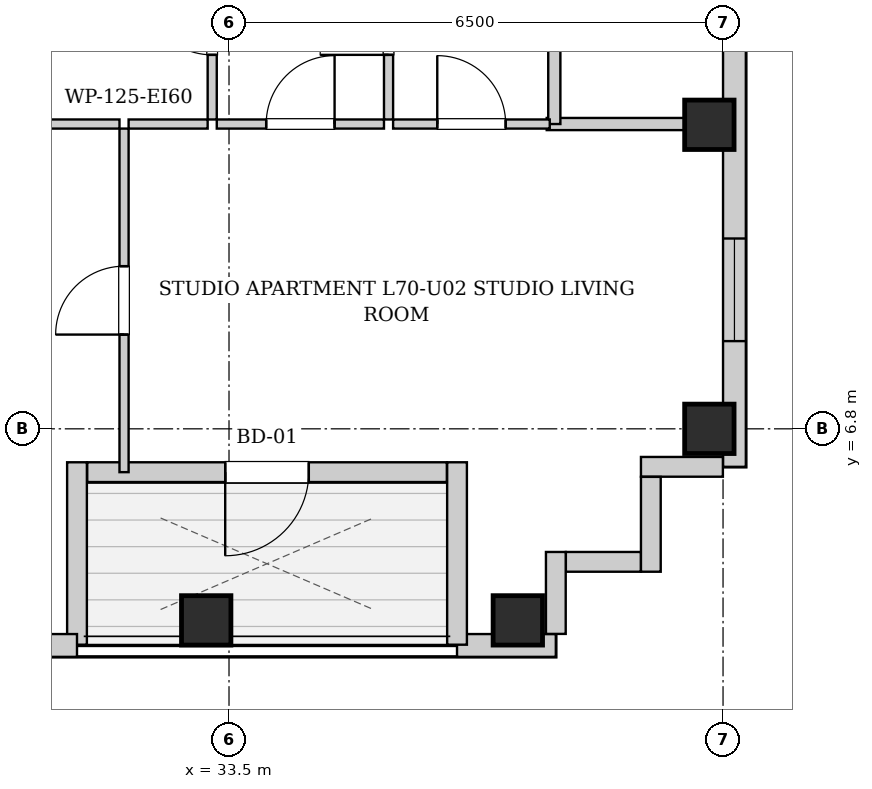
"""IFC4 building model, lengths in metres.
Left out: names, types, materials, properties, quantities, classifications, styles, units other than length and angle.
Written with IfcOpenShell. Run it as: python <this file> out.ifc"""

import sys

from ifc_helpers import new_model, si_unit, direction, frame, frame_2d, origin, origin_2d, place, context, subcontext, project, spatial, rectangle, extrude, element, fill, save


model = new_model("IFC4")
c1 = context("Model", 3, precision=1e-05, world=origin(), true_north=direction((0.0, 1.0)))
c2 = subcontext(c1, "Body", "Model", "MODEL_VIEW")
j1 = project(units=[si_unit("LENGTHUNIT", "METRE"), si_unit("PLANEANGLEUNIT", "RADIAN")], contexts=[c1])
p1 = place(None, origin())
s1 = spatial("IfcSite", under=j1, at=p1, CompositionType="ELEMENT")
p2 = place(p1, origin())
s2 = spatial("IfcBuilding", under=s1, at=p2, CompositionType="ELEMENT")
p3 = place(p2, frame((0.0, 0.0, 241.1)))
s3 = spatial("IfcBuildingStorey", under=s2, at=p3, CompositionType="ELEMENT", Elevation=241.1)
for number, where, z_axis, x_axis in (
    (1, (33.2, 4.28, 0.0), (0.0, 0.0, 1.0), (1.0, 0.0, 0.0)),
    (2, (37.3, 4.28, 0.0), (0.0, 0.0, 1.0), (1.0, 0.0, 0.0)),
    (3, (39.82, 6.8, 0.0), (0.0, 0.0, 1.0), (1.0, 0.0, 0.0)),
    (4, (39.82, 10.8, 0.0), (0.0, 0.0, 1.0), (1.0, 0.0, 0.0)),
):
    element("IfcColumn", number, at=place(p3, frame(where, z_axis=z_axis, x_axis=x_axis)), inside=s3, PredefinedType="COLUMN", context=c2, shape_type="SweptSolid", body=[
        extrude(rectangle(XDim=0.65, YDim=0.65, at=origin_2d()), origin(), (0.0, 0.0, 1.0), 3.4),
    ])
p4 = place(p3, frame((40.15, 37.7, 0.0), z_axis=(0.0, 0.0, 1.0), x_axis=(0.0, -1.0, 0.0)))
e5 = element("IfcWall", 5, at=p4, inside=s3, PredefinedType="SOLIDWALL", context=c2, shape_type="SweptSolid", body=[
    extrude(rectangle(XDim=31.4, YDim=0.3, at=frame_2d((15.7, 0.0))), origin(), (0.0, 0.0, 1.0), 3.14),
])
p5 = place(p4, frame((28.396, 0.0, 0.55)))
e6 = element("IfcOpeningElement", 6, at=p5, cuts=e5, PredefinedType="OPENING", context=c2, shape_type="SweptSolid", body=[
    extrude(rectangle(XDim=1.35, YDim=1.2, at=frame_2d((0.675, 0.6))), frame((0.0, 0.16, 0.0), z_axis=(0.0, -1.0, 0.0), x_axis=(1.0, 0.0, 0.0)), (0.0, 0.0, 1.0), 0.32),
])
p6 = place(p4, frame((1.653, 0.0, 0.55)))
e7 = element("IfcOpeningElement", 7, at=p6, cuts=e5, PredefinedType="OPENING", context=c2, shape_type="SweptSolid", body=[
    extrude(rectangle(XDim=1.35, YDim=1.2, at=frame_2d((0.675, 0.6))), frame((0.0, 0.16, 0.0), z_axis=(0.0, -1.0, 0.0), x_axis=(1.0, 0.0, 0.0)), (0.0, 0.0, 1.0), 0.32),
])
p7 = place(p4, frame((19.683, 0.0, 0.55)))
e8 = element("IfcOpeningElement", 8, at=p7, cuts=e5, PredefinedType="OPENING", context=c2, shape_type="SweptSolid", body=[
    extrude(rectangle(XDim=1.35, YDim=1.2, at=frame_2d((0.675, 0.6))), frame((0.0, 0.16, 0.0), z_axis=(0.0, -1.0, 0.0), x_axis=(1.0, 0.0, 0.0)), (0.0, 0.0, 1.0), 0.32),
])
p8 = place(p4, frame((10.367, 0.0, 0.55)))
e9 = element("IfcOpeningElement", 9, at=p8, cuts=e5, PredefinedType="OPENING", context=c2, shape_type="SweptSolid", body=[
    extrude(rectangle(XDim=1.35, YDim=1.2, at=frame_2d((0.675, 0.6))), frame((0.0, 0.16, 0.0), z_axis=(0.0, -1.0, 0.0), x_axis=(1.0, 0.0, 0.0)), (0.0, 0.0, 1.0), 0.32),
])
p9 = place(p3, frame((37.8, 3.95, 0.0), z_axis=(0.0, 0.0, 1.0), x_axis=(-1.0, 0.0, 0.0)))
e10 = element("IfcWall", 10, at=p9, inside=s3, PredefinedType="SOLIDWALL", context=c2, shape_type="SweptSolid", body=[
    extrude(rectangle(XDim=1.3, YDim=0.3, at=frame_2d((0.65, 0.0))), origin(), (0.0, 0.0, 1.0), 3.14),
])
p10 = place(p3, frame((36.5, 3.96, 0.0), z_axis=(0.0, 0.0, 1.0), x_axis=(0.0, 1.0, 0.0)))
e11 = element("IfcWall", 11, at=p10, inside=s3, PredefinedType="SOLIDWALL", context=c2, shape_type="SweptSolid", body=[
    extrude(rectangle(XDim=2.4, YDim=0.26, at=frame_2d((1.2, 0.0))), origin(), (0.0, 0.0, 1.0), 3.14),
])
p11 = place(p3, frame((36.366, 6.23, 0.0), z_axis=(0.0, 0.0, 1.0), x_axis=(-1.0, 0.0, 0.0)))
e12 = element("IfcWall", 12, at=p11, inside=s3, PredefinedType="SOLIDWALL", context=c2, shape_type="SweptSolid", body=[
    extrude(rectangle(XDim=4.732, YDim=0.26, at=frame_2d((2.366, 0.0))), origin(), (0.0, 0.0, 1.0), 3.14),
])
p12 = place(p11, frame((1.816, 0.0, 0.0)))
e13 = element("IfcOpeningElement", 13, at=p12, cuts=e12, PredefinedType="OPENING", context=c2, shape_type="SweptSolid", body=[
    extrude(rectangle(XDim=1.1, YDim=2.0, at=frame_2d((0.55, 1.0))), frame((0.0, 0.14, 0.0), z_axis=(0.0, -1.0, 0.0), x_axis=(1.0, 0.0, 0.0)), (0.0, 0.0, 1.0), 0.28),
])
p13 = place(p3, frame((31.5, 6.36, 0.0), z_axis=(0.0, 0.0, 1.0), x_axis=(0.0, -1.0, 0.0)))
e14 = element("IfcWall", 14, at=p13, inside=s3, PredefinedType="SOLIDWALL", context=c2, shape_type="SweptSolid", body=[
    extrude(rectangle(XDim=2.4, YDim=0.26, at=frame_2d((1.2, 0.0))), origin(), (0.0, 0.0, 1.0), 3.14),
])
p14 = place(p3, frame((31.5, 3.95, 0.0), z_axis=(0.0, 0.0, 1.0), x_axis=(-1.0, 0.0, 0.0)))
e15 = element("IfcWall", 15, at=p14, inside=s3, PredefinedType="SOLIDWALL", context=c2, shape_type="SweptSolid", body=[
    extrude(rectangle(XDim=10.1, YDim=0.3, at=frame_2d((5.05, 0.0))), origin(), (0.0, 0.0, 1.0), 3.14),
])
p15 = place(p14, frame((3.15, 0.0, 0.55)))
e16 = element("IfcOpeningElement", 16, at=p15, cuts=e15, PredefinedType="OPENING", context=c2, shape_type="SweptSolid", body=[
    extrude(rectangle(XDim=0.85, YDim=1.2, at=frame_2d((0.425, 0.6))), frame((0.0, 0.16, 0.0), z_axis=(0.0, -1.0, 0.0), x_axis=(1.0, 0.0, 0.0)), (0.0, 0.0, 1.0), 0.32),
])
p16 = place(p14, frame((0.757, 0.0, 0.55)))
e17 = element("IfcOpeningElement", 17, at=p16, cuts=e15, PredefinedType="OPENING", context=c2, shape_type="SweptSolid", body=[
    extrude(rectangle(XDim=1.35, YDim=1.2, at=frame_2d((0.675, 0.6))), frame((0.0, 0.16, 0.0), z_axis=(0.0, -1.0, 0.0), x_axis=(1.0, 0.0, 0.0)), (0.0, 0.0, 1.0), 0.32),
])
p17 = place(p3, frame((39.998, 6.3, 0.0), z_axis=(0.0, 0.0, 1.0), x_axis=(-1.0, 0.0, 0.0)))
e18 = element("IfcWall", 18, at=p17, inside=s3, PredefinedType="SOLIDWALL", context=c2, shape_type="SweptSolid", body=[
    extrude(rectangle(XDim=1.078, YDim=0.26, at=frame_2d((0.539, 0.0))), origin(), (0.0, 0.0, 1.0), 3.14),
])
p18 = place(p3, frame((39.05, 6.168, 0.0), z_axis=(0.0, 0.0, 1.0), x_axis=(0.0, -1.0, 0.0)))
e19 = element("IfcWall", 19, at=p18, inside=s3, PredefinedType="SOLIDWALL", context=c2, shape_type="SweptSolid", body=[
    extrude(rectangle(XDim=1.248, YDim=0.26, at=frame_2d((0.624, 0.0))), origin(), (0.0, 0.0, 1.0), 3.14),
])
p19 = place(p3, frame((38.918, 5.05, 0.0), z_axis=(0.0, 0.0, 1.0), x_axis=(-1.0, 0.0, 0.0)))
e20 = element("IfcWall", 20, at=p19, inside=s3, PredefinedType="SOLIDWALL", context=c2, shape_type="SweptSolid", body=[
    extrude(rectangle(XDim=0.986, YDim=0.26, at=frame_2d((0.493, 0.0))), origin(), (0.0, 0.0, 1.0), 3.14),
])
p20 = place(p3, frame((37.8, 5.18, 0.0), z_axis=(0.0, 0.0, 1.0), x_axis=(0.0, -1.0, 0.0)))
e21 = element("IfcWall", 21, at=p20, inside=s3, PredefinedType="SOLIDWALL", context=c2, shape_type="SweptSolid", body=[
    extrude(rectangle(XDim=1.078, YDim=0.26, at=frame_2d((0.539, 0.0))), origin(), (0.0, 0.0, 1.0), 3.14),
])
p21 = place(p3, frame((37.68, 10.81, 0.0), z_axis=(0.0, 0.0, 1.0), x_axis=(1.0, 0.0, 0.0)))
e22 = element("IfcWall", 22, at=p21, inside=s3, PredefinedType="PARTITIONING", context=c2, shape_type="SweptSolid", body=[
    extrude(rectangle(XDim=2.34, YDim=0.16, at=frame_2d((1.17, 0.0))), origin(), (0.0, 0.0, 1.0), 3.14),
])
p22 = place(p3, frame((37.78, 10.81, 0.0), z_axis=(0.0, 0.0, 1.0), x_axis=(0.0, 1.0, 0.0)))
e23 = element("IfcWall", 23, at=p22, inside=s3, PredefinedType="PARTITIONING", context=c2, shape_type="SweptSolid", body=[
    extrude(rectangle(XDim=2.66, YDim=0.16, at=frame_2d((1.33, 0.0))), origin(), (0.0, 0.0, 1.0), 3.14),
])
p23 = place(p3, frame((33.279, 10.87, 0.0), z_axis=(0.0, 0.0, 1.0), x_axis=(0.0, 1.0, 0.0)))
e24 = element("IfcWall", 24, at=p23, inside=s3, PredefinedType="PARTITIONING", context=c2, shape_type="SweptSolid", body=[
    extrude(rectangle(XDim=2.6, YDim=0.12, at=frame_2d((1.3, 0.0))), origin(), (0.0, 0.0, 1.0), 2.668),
])
p24 = place(p23, frame((0.85, 0.0, 0.0)))
e25 = element("IfcOpeningElement", 25, at=p24, cuts=e24, PredefinedType="OPENING", context=c2, shape_type="SweptSolid", body=[
    extrude(rectangle(XDim=0.9, YDim=2.05, at=frame_2d((0.45, 1.025))), frame((0.0, 0.07, 0.0), z_axis=(0.0, -1.0, 0.0), x_axis=(1.0, 0.0, 0.0)), (0.0, 0.0, 1.0), 0.14),
])
for number, where, z_axis, x_axis in (
    (26, (31.019, 10.81, 0.0), (0.0, 0.0, 1.0), (1.0, 0.0, 0.0)),
    (27, (32.179, 10.81, 0.0), (0.0, 0.0, 1.0), (1.0, 0.0, 0.0)),
):
    element("IfcWall", number, at=place(p3, frame(where, z_axis=z_axis, x_axis=x_axis)), inside=s3, PredefinedType="PARTITIONING", context=c2, shape_type="SweptSolid", body=[
        extrude(rectangle(XDim=1.04, YDim=0.12, at=frame_2d((0.52, 0.0))), origin(), (0.0, 0.0, 1.0), 3.14),
    ])
p25 = place(p3, frame((35.599, 10.87, 0.0), z_axis=(0.0, 0.0, 1.0), x_axis=(0.0, 1.0, 0.0)))
e28 = element("IfcWall", 28, at=p25, inside=s3, PredefinedType="PARTITIONING", context=c2, shape_type="SweptSolid", body=[
    extrude(rectangle(XDim=2.6, YDim=0.12, at=frame_2d((1.3, 0.0))), origin(), (0.0, 0.0, 1.0), 3.14),
])
p26 = place(p25, frame((0.85, 0.0, 0.0)))
e29 = element("IfcOpeningElement", 29, at=p26, cuts=e28, PredefinedType="OPENING", context=c2, shape_type="SweptSolid", body=[
    extrude(rectangle(XDim=0.9, YDim=2.05, at=frame_2d((0.45, 1.025))), frame((0.0, 0.07, 0.0), z_axis=(0.0, -1.0, 0.0), x_axis=(1.0, 0.0, 0.0)), (0.0, 0.0, 1.0), 0.14),
])
p27 = place(p3, frame((33.339, 10.81, 0.0), z_axis=(0.0, 0.0, 1.0), x_axis=(1.0, 0.0, 0.0)))
e30 = element("IfcWall", 30, at=p27, inside=s3, PredefinedType="PARTITIONING", context=c2, shape_type="SweptSolid", body=[
    extrude(rectangle(XDim=2.2, YDim=0.12, at=frame_2d((1.1, 0.0))), origin(), (0.0, 0.0, 1.0), 3.14),
])
p28 = place(p27, frame((0.65, 0.0, 0.0)))
e31 = element("IfcOpeningElement", 31, at=p28, cuts=e30, PredefinedType="OPENING", context=c2, shape_type="SweptSolid", body=[
    extrude(rectangle(XDim=0.9, YDim=2.05, at=frame_2d((0.45, 1.025))), frame((0.0, 0.07, 0.0), z_axis=(0.0, -1.0, 0.0), x_axis=(1.0, 0.0, 0.0)), (0.0, 0.0, 1.0), 0.14),
])
p29 = place(p3, frame((35.659, 10.81, 0.0), z_axis=(0.0, 0.0, 1.0), x_axis=(1.0, 0.0, 0.0)))
e32 = element("IfcWall", 32, at=p29, inside=s3, PredefinedType="PARTITIONING", context=c2, shape_type="SweptSolid", body=[
    extrude(rectangle(XDim=2.061, YDim=0.12, at=frame_2d((1.031, 0.0))), origin(), (0.0, 0.0, 1.0), 3.14),
])
p30 = place(p29, frame((0.581, 0.0, 0.0)))
e33 = element("IfcOpeningElement", 33, at=p30, cuts=e32, PredefinedType="OPENING", context=c2, shape_type="SweptSolid", body=[
    extrude(rectangle(XDim=0.9, YDim=2.05, at=frame_2d((0.45, 1.025))), frame((0.0, 0.07, 0.0), z_axis=(0.0, -1.0, 0.0), x_axis=(1.0, 0.0, 0.0)), (0.0, 0.0, 1.0), 0.14),
])
p31 = place(p3, frame((32.119, 6.23, 0.0), z_axis=(0.0, 0.0, 1.0), x_axis=(0.0, 1.0, 0.0)))
e34 = element("IfcWall", 34, at=p31, inside=s3, PredefinedType="PARTITIONING", context=c2, shape_type="SweptSolid", body=[
    extrude(rectangle(XDim=4.52, YDim=0.12, at=frame_2d((2.26, 0.0))), origin(), (0.0, 0.0, 1.0), 3.14),
])
p32 = place(p31, frame((1.81, 0.0, 0.0)))
e35 = element("IfcOpeningElement", 35, at=p32, cuts=e34, PredefinedType="OPENING", context=c2, shape_type="SweptSolid", body=[
    extrude(rectangle(XDim=0.9, YDim=2.05, at=frame_2d((0.45, 1.025))), frame((0.0, 0.07, 0.0), z_axis=(0.0, -1.0, 0.0), x_axis=(1.0, 0.0, 0.0)), (0.0, 0.0, 1.0), 0.14),
])
p33 = place(p24, origin())
e36 = element("IfcDoor", 36, at=p33, inside=s3, OperationType="SINGLE_SWING_RIGHT", PredefinedType="DOOR", context=c2, shape_type="SweptSolid", body=[
    extrude(rectangle(XDim=0.9, YDim=2.05, at=frame_2d((0.45, 1.025))), frame((0.0, 0.025, 0.0), z_axis=(0.0, -1.0, 0.0), x_axis=(1.0, 0.0, 0.0)), (0.0, 0.0, 1.0), 0.05),
])
fill(e25, e36)
p34 = place(p26, origin())
e37 = element("IfcDoor", 37, at=p34, inside=s3, OperationType="SINGLE_SWING_LEFT", PredefinedType="DOOR", context=c2, shape_type="SweptSolid", body=[
    extrude(rectangle(XDim=0.9, YDim=2.05, at=frame_2d((0.45, 1.025))), frame((0.0, 0.025, 0.0), z_axis=(0.0, -1.0, 0.0), x_axis=(1.0, 0.0, 0.0)), (0.0, 0.0, 1.0), 0.05),
])
fill(e29, e37)
p35 = place(p28, origin())
e38 = element("IfcDoor", 38, at=p35, inside=s3, OperationType="SINGLE_SWING_RIGHT", PredefinedType="DOOR", context=c2, shape_type="SweptSolid", body=[
    extrude(rectangle(XDim=0.9, YDim=2.05, at=frame_2d((0.45, 1.025))), frame((0.0, 0.025, 0.0), z_axis=(0.0, -1.0, 0.0), x_axis=(1.0, 0.0, 0.0)), (0.0, 0.0, 1.0), 0.05),
])
fill(e31, e38)
p36 = place(p30, origin())
e39 = element("IfcDoor", 39, at=p36, inside=s3, OperationType="SINGLE_SWING_LEFT", PredefinedType="DOOR", context=c2, shape_type="SweptSolid", body=[
    extrude(rectangle(XDim=0.9, YDim=2.05, at=frame_2d((0.45, 1.025))), frame((0.0, 0.025, 0.0), z_axis=(0.0, -1.0, 0.0), x_axis=(1.0, 0.0, 0.0)), (0.0, 0.0, 1.0), 0.05),
])
fill(e33, e39)
p37 = place(p32, origin())
e40 = element("IfcDoor", 40, at=p37, inside=s3, OperationType="SINGLE_SWING_LEFT", PredefinedType="DOOR", context=c2, shape_type="SweptSolid", body=[
    extrude(rectangle(XDim=0.9, YDim=2.05, at=frame_2d((0.45, 1.025))), frame((0.0, 0.025, 0.0), z_axis=(0.0, -1.0, 0.0), x_axis=(1.0, 0.0, 0.0)), (0.0, 0.0, 1.0), 0.05),
])
fill(e35, e40)
p38 = place(p12, origin())
e41 = element("IfcDoor", 41, at=p38, inside=s3, OperationType="SINGLE_SWING_RIGHT", PredefinedType="DOOR", context=c2, shape_type="SweptSolid", body=[
    extrude(rectangle(XDim=1.1, YDim=2.0, at=frame_2d((0.55, 1.0))), frame((0.0, 0.025, 0.0), z_axis=(0.0, -1.0, 0.0), x_axis=(1.0, 0.0, 0.0)), (0.0, 0.0, 1.0), 0.05),
])
fill(e13, e41)
p39 = place(p5, origin())
e42 = element("IfcWindow", 42, at=p39, inside=s3, PartitioningType="SINGLE_PANEL", PredefinedType="WINDOW", context=c2, shape_type="SweptSolid", body=[
    extrude(rectangle(XDim=1.35, YDim=1.2, at=frame_2d((0.675, 0.6))), frame((0.0, 0.03, 0.0), z_axis=(0.0, -1.0, 0.0), x_axis=(1.0, 0.0, 0.0)), (0.0, 0.0, 1.0), 0.06),
])
fill(e6, e42)
save(model, sys.argv[1])
